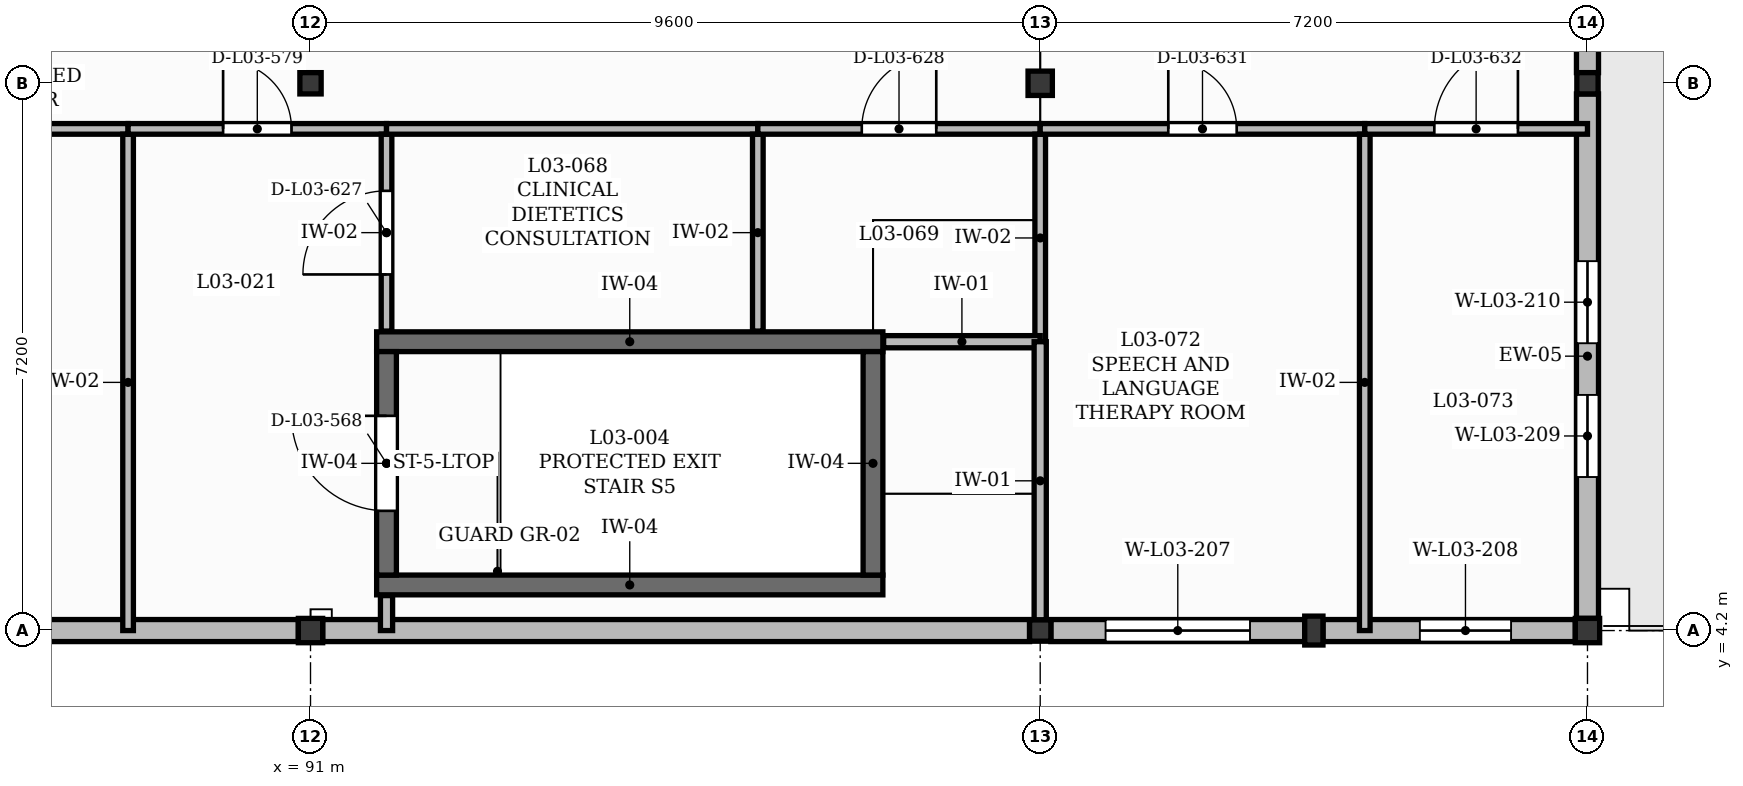
"""IFC4 building model, lengths in metres.
Left out: names, types, materials, properties, quantities, classifications, styles, units other than length and angle.
Written with IfcOpenShell. Run it as: python <this file> out.ifc"""

import sys

from ifc_helpers import new_model, si_unit, direction, frame, frame_2d, origin, origin_2d, place, context, subcontext, project, spatial, rectangle, extrude, element, fill, save


model = new_model("IFC4")
c1 = context("Model", 3, precision=1e-05, world=origin(), true_north=direction((0.0, 1.0)))
c2 = subcontext(c1, "Body", "Model", "MODEL_VIEW")
j1 = project(units=[si_unit("LENGTHUNIT", "METRE"), si_unit("PLANEANGLEUNIT", "RADIAN")], contexts=[c1])
p1 = place(None, origin())
s1 = spatial("IfcSite", under=j1, at=p1, CompositionType="ELEMENT")
p2 = place(p1, origin())
s2 = spatial("IfcBuilding", under=s1, at=p2, CompositionType="ELEMENT")
p3 = place(p2, frame((0.0, 0.0, 13.2)))
s3 = spatial("IfcBuildingStorey", under=s2, at=p3, CompositionType="ELEMENT", Elevation=13.2)
p4 = place(p3, frame((91.0, 4.2, 0.0), z_axis=(0.0, 0.0, 1.0), x_axis=(1.0, 0.0, 0.0)))
e1 = element("IfcColumn", 1, at=p4, inside=s3, PredefinedType="COLUMN", context=c2, shape_type="SweptSolid", body=[
    extrude(rectangle(XDim=0.32, YDim=0.32, at=origin_2d()), origin(), (0.0, 0.0, 1.0), 3.98),
])
p5 = place(p3, frame((91.0, 11.4, 0.0), z_axis=(0.0, 0.0, 1.0), x_axis=(1.0, 0.0, 0.0)))
e2 = element("IfcColumn", 2, at=p5, inside=s3, PredefinedType="COLUMN", context=c2, shape_type="SweptSolid", body=[
    extrude(rectangle(XDim=0.28, YDim=0.28, at=origin_2d()), origin(), (0.0, 0.0, 1.0), 6.045),
])
p6 = place(p3, frame((100.6, 4.2, 0.0), z_axis=(0.0, 0.0, 1.0), x_axis=(1.0, 0.0, 0.0)))
e3 = element("IfcColumn", 3, at=p6, inside=s3, PredefinedType="COLUMN", context=c2, shape_type="SweptSolid", body=[
    extrude(rectangle(XDim=0.28, YDim=0.28, at=origin_2d()), origin(), (0.0, 0.0, 1.0), 3.98),
])
p7 = place(p3, frame((100.6, 11.4, 0.0), z_axis=(0.0, 0.0, 1.0), x_axis=(1.0, 0.0, 0.0)))
e4 = element("IfcColumn", 4, at=p7, inside=s3, PredefinedType="COLUMN", context=c2, shape_type="SweptSolid", body=[
    extrude(rectangle(XDim=0.32, YDim=0.32, at=origin_2d()), origin(), (0.0, 0.0, 1.0), 6.045),
])
p8 = place(p3, frame((107.8, 4.2, 0.0), z_axis=(0.0, 0.0, 1.0), x_axis=(1.0, 0.0, 0.0)))
e5 = element("IfcColumn", 5, at=p8, inside=s3, PredefinedType="COLUMN", context=c2, shape_type="SweptSolid", body=[
    extrude(rectangle(XDim=0.32, YDim=0.32, at=origin_2d()), origin(), (0.0, 0.0, 1.0), 3.98),
])
p9 = place(p3, frame((107.8, 11.4, 0.0), z_axis=(0.0, 0.0, 1.0), x_axis=(1.0, 0.0, 0.0)))
e6 = element("IfcColumn", 6, at=p9, inside=s3, PredefinedType="COLUMN", context=c2, shape_type="SweptSolid", body=[
    extrude(rectangle(XDim=0.28, YDim=0.28, at=origin_2d()), origin(), (0.0, 0.0, 1.0), 6.045),
])
p10 = place(p3, frame((104.2, 4.2, 0.0), z_axis=(0.0, 0.0, 1.0), x_axis=(1.0, 0.0, 0.0)))
e7 = element("IfcColumn", 7, at=p10, inside=s3, PredefinedType="PILASTER", context=c2, shape_type="SweptSolid", body=[
    extrude(rectangle(XDim=0.24, YDim=0.38, at=origin_2d()), origin(), (0.0, 0.0, 1.0), 4.0),
])
p11 = place(p3, frame((86.32, 4.2, 0.0), z_axis=(0.0, 0.0, 1.0), x_axis=(1.0, 0.0, 0.0)))
e8 = element("IfcWall", 8, at=p11, inside=s3, PredefinedType="SOLIDWALL", context=c2, shape_type="SweptSolid", body=[
    extrude(rectangle(XDim=4.52, YDim=0.29, at=frame_2d((2.26, 0.0))), origin(), (0.0, 0.0, 1.0), 4.0),
])
p12 = place(p3, frame((91.16, 4.2, 0.0), z_axis=(0.0, 0.0, 1.0), x_axis=(1.0, 0.0, 0.0)))
e9 = element("IfcWall", 9, at=p12, inside=s3, PredefinedType="SOLIDWALL", context=c2, shape_type="SweptSolid", body=[
    extrude(rectangle(XDim=9.3, YDim=0.29, at=frame_2d((4.65, 0.0))), origin(), (0.0, 0.0, 1.0), 4.0),
])
p13 = place(p3, frame((100.74, 4.2, 0.0), z_axis=(0.0, 0.0, 1.0), x_axis=(1.0, 0.0, 0.0)))
e10 = element("IfcWall", 10, at=p13, inside=s3, PredefinedType="SOLIDWALL", context=c2, shape_type="SweptSolid", body=[
    extrude(rectangle(XDim=3.34, YDim=0.29, at=frame_2d((1.67, 0.0))), origin(), (0.0, 0.0, 1.0), 4.0),
])
p14 = place(p13, frame((0.72, 0.0, 1.0)))
e11 = element("IfcOpeningElement", 11, at=p14, cuts=e10, PredefinedType="OPENING", context=c2, shape_type="SweptSolid", body=[
    extrude(rectangle(XDim=1.9, YDim=1.95, at=frame_2d((0.95, 0.975))), frame((0.0, 0.155, 0.0), z_axis=(0.0, -1.0, 0.0), x_axis=(1.0, 0.0, 0.0)), (0.0, 0.0, 1.0), 0.31),
])
p15 = place(p3, frame((104.32, 4.2, 0.0), z_axis=(0.0, 0.0, 1.0), x_axis=(1.0, 0.0, 0.0)))
e12 = element("IfcWall", 12, at=p15, inside=s3, PredefinedType="SOLIDWALL", context=c2, shape_type="SweptSolid", body=[
    extrude(rectangle(XDim=3.32, YDim=0.29, at=frame_2d((1.66, 0.0))), origin(), (0.0, 0.0, 1.0), 4.0),
])
p16 = place(p15, frame((1.275, 0.0, 1.0)))
e13 = element("IfcOpeningElement", 13, at=p16, cuts=e12, PredefinedType="OPENING", context=c2, shape_type="SweptSolid", body=[
    extrude(rectangle(XDim=1.2, YDim=1.95, at=frame_2d((0.6, 0.975))), frame((0.0, 0.155, 0.0), z_axis=(0.0, -1.0, 0.0), x_axis=(1.0, 0.0, 0.0)), (0.0, 0.0, 1.0), 0.31),
])
p17 = place(p3, frame((107.8, 4.36, 0.0), z_axis=(0.0, 0.0, 1.0), x_axis=(0.0, 1.0, 0.0)))
e14 = element("IfcWall", 14, at=p17, inside=s3, PredefinedType="SOLIDWALL", context=c2, shape_type="SweptSolid", body=[
    extrude(rectangle(XDim=6.9, YDim=0.29, at=frame_2d((3.45, 0.0))), origin(), (0.0, 0.0, 1.0), 4.0),
])
p18 = place(p17, frame((1.86, 0.0, 1.0)))
e15 = element("IfcOpeningElement", 15, at=p18, cuts=e14, PredefinedType="OPENING", context=c2, shape_type="SweptSolid", body=[
    extrude(rectangle(XDim=1.08, YDim=1.95, at=frame_2d((0.54, 0.975))), frame((0.0, 0.155, 0.0), z_axis=(0.0, -1.0, 0.0), x_axis=(1.0, 0.0, 0.0)), (0.0, 0.0, 1.0), 0.31),
])
p19 = place(p17, frame((3.62, 0.0, 1.0)))
e16 = element("IfcOpeningElement", 16, at=p19, cuts=e14, PredefinedType="OPENING", context=c2, shape_type="SweptSolid", body=[
    extrude(rectangle(XDim=1.08, YDim=1.95, at=frame_2d((0.54, 0.975))), frame((0.0, 0.155, 0.0), z_axis=(0.0, -1.0, 0.0), x_axis=(1.0, 0.0, 0.0)), (0.0, 0.0, 1.0), 0.31),
])
p20 = place(p3, frame((107.8, 11.54, 0.0), z_axis=(0.0, 0.0, 1.0), x_axis=(0.0, 1.0, 0.0)))
e17 = element("IfcWall", 17, at=p20, inside=s3, PredefinedType="SOLIDWALL", context=c2, shape_type="SweptSolid", body=[
    extrude(rectangle(XDim=6.9, YDim=0.29, at=frame_2d((3.45, 0.0))), origin(), (0.0, 0.0, 1.0), 4.0),
])
p21 = place(p20, frame((2.9, 0.0, 0.0)))
e18 = element("IfcOpeningElement", 18, at=p21, cuts=e17, PredefinedType="OPENING", context=c2, shape_type="SweptSolid", body=[
    extrude(rectangle(XDim=1.1, YDim=2.25, at=frame_2d((0.55, 1.125))), frame((0.0, 0.155, 0.0), z_axis=(0.0, -1.0, 0.0), x_axis=(1.0, 0.0, 0.0)), (0.0, 0.0, 1.0), 0.31),
])
p22 = place(p20, frame((4.82, 0.0, 1.0)))
e19 = element("IfcOpeningElement", 19, at=p22, cuts=e17, PredefinedType="OPENING", context=c2, shape_type="SweptSolid", body=[
    extrude(rectangle(XDim=1.2, YDim=1.95, at=frame_2d((0.6, 0.975))), frame((0.0, 0.155, 0.0), z_axis=(0.0, -1.0, 0.0), x_axis=(1.0, 0.0, 0.0)), (0.0, 0.0, 1.0), 0.31),
])
for number, where, z_axis, x_axis in (
    (20, (91.87, 4.8, 0.0), (0.0, 0.0, 1.0), (1.0, 0.0, 0.0)),
    (21, (91.87, 8.0, 0.0), (0.0, 0.0, 1.0), (1.0, 0.0, 0.0)),
):
    element("IfcWall", number, at=place(p3, frame(where, z_axis=z_axis, x_axis=x_axis)), inside=s3, PredefinedType="SHEAR", context=c2, shape_type="SweptSolid", body=[
        extrude(rectangle(XDim=6.66, YDim=0.26, at=frame_2d((3.33, 0.0))), origin(), (0.0, 0.0, 1.0), 3.85),
    ])
p23 = place(p3, frame((92.0, 4.93, 0.0), z_axis=(0.0, 0.0, 1.0), x_axis=(0.0, 1.0, 0.0)))
e22 = element("IfcWall", 22, at=p23, inside=s3, PredefinedType="SHEAR", context=c2, shape_type="SweptSolid", body=[
    extrude(rectangle(XDim=2.94, YDim=0.26, at=frame_2d((1.47, 0.0))), origin(), (0.0, 0.0, 1.0), 3.85),
])
p24 = place(p23, frame((0.845, 0.0, 0.0)))
e23 = element("IfcOpeningElement", 23, at=p24, cuts=e22, PredefinedType="OPENING", context=c2, shape_type="SweptSolid", body=[
    extrude(rectangle(XDim=1.25, YDim=2.15, at=frame_2d((0.625, 1.075))), frame((0.0, 0.14, 0.0), z_axis=(0.0, -1.0, 0.0), x_axis=(1.0, 0.0, 0.0)), (0.0, 0.0, 1.0), 0.28),
])
p25 = place(p3, frame((98.4, 4.93, 0.0), z_axis=(0.0, 0.0, 1.0), x_axis=(0.0, 1.0, 0.0)))
e24 = element("IfcWall", 24, at=p25, inside=s3, PredefinedType="SHEAR", context=c2, shape_type="SweptSolid", body=[
    extrude(rectangle(XDim=2.94, YDim=0.26, at=frame_2d((1.47, 0.0))), origin(), (0.0, 0.0, 1.0), 3.85),
])
p26 = place(p3, frame((81.4, 10.8, 0.0), z_axis=(0.0, 0.0, 1.0), x_axis=(1.0, 0.0, 0.0)))
e25 = element("IfcWall", 25, at=p26, inside=s3, PredefinedType="PARTITIONING", context=c2, shape_type="SweptSolid", body=[
    extrude(rectangle(XDim=7.2, YDim=0.14, at=frame_2d((3.6, 0.0))), origin(), (0.0, 0.0, 1.0), 3.75),
])
p27 = place(p26, frame((3.15, 0.0, 0.0)))
e26 = element("IfcOpeningElement", 26, at=p27, cuts=e25, PredefinedType="OPENING", context=c2, shape_type="SweptSolid", body=[
    extrude(rectangle(XDim=0.9, YDim=2.1, at=frame_2d((0.45, 1.05))), frame((0.0, 0.08, 0.0), z_axis=(0.0, -1.0, 0.0), x_axis=(1.0, 0.0, 0.0)), (0.0, 0.0, 1.0), 0.16),
])
p28 = place(p3, frame((88.6, 4.2, 0.0), z_axis=(0.0, 0.0, 1.0), x_axis=(0.0, 1.0, 0.0)))
e27 = element("IfcWall", 27, at=p28, inside=s3, PredefinedType="PARTITIONING", context=c2, shape_type="SweptSolid", body=[
    extrude(rectangle(XDim=6.53, YDim=0.14, at=frame_2d((3.265, 0.0))), origin(), (0.0, 0.0, 1.0), 3.75),
])
p29 = place(p3, frame((88.6, 10.8, 0.0), z_axis=(0.0, 0.0, 1.0), x_axis=(1.0, 0.0, 0.0)))
e28 = element("IfcWall", 28, at=p29, inside=s3, PredefinedType="PARTITIONING", context=c2, shape_type="SweptSolid", body=[
    extrude(rectangle(XDim=3.4, YDim=0.14, at=frame_2d((1.7, 0.0))), origin(), (0.0, 0.0, 1.0), 3.75),
])
p30 = place(p29, frame((1.25, 0.0, 0.0)))
e29 = element("IfcOpeningElement", 29, at=p30, cuts=e28, PredefinedType="OPENING", context=c2, shape_type="SweptSolid", body=[
    extrude(rectangle(XDim=0.9, YDim=2.1, at=frame_2d((0.45, 1.05))), frame((0.0, 0.08, 0.0), z_axis=(0.0, -1.0, 0.0), x_axis=(1.0, 0.0, 0.0)), (0.0, 0.0, 1.0), 0.16),
])
p31 = place(p3, frame((92.0, 8.14, 0.0), z_axis=(0.0, 0.0, 1.0), x_axis=(0.0, 1.0, 0.0)))
e30 = element("IfcWall", 30, at=p31, inside=s3, PredefinedType="PARTITIONING", context=c2, shape_type="SweptSolid", body=[
    extrude(rectangle(XDim=2.59, YDim=0.14, at=frame_2d((1.295, 0.0))), origin(), (0.0, 0.0, 1.0), 3.75),
])
p32 = place(p31, frame((0.745, 0.0, 0.0)))
e31 = element("IfcOpeningElement", 31, at=p32, cuts=e30, PredefinedType="OPENING", context=c2, shape_type="SweptSolid", body=[
    extrude(rectangle(XDim=1.1, YDim=2.1, at=frame_2d((0.55, 1.05))), frame((0.0, 0.08, 0.0), z_axis=(0.0, -1.0, 0.0), x_axis=(1.0, 0.0, 0.0)), (0.0, 0.0, 1.0), 0.16),
])
p33 = place(p3, frame((92.0, 10.8, 0.0), z_axis=(0.0, 0.0, 1.0), x_axis=(1.0, 0.0, 0.0)))
e32 = element("IfcWall", 32, at=p33, inside=s3, PredefinedType="PARTITIONING", context=c2, shape_type="SweptSolid", body=[
    extrude(rectangle(XDim=4.885, YDim=0.14, at=frame_2d((2.442, 0.0))), origin(), (0.0, 0.0, 1.0), 3.75),
])
p34 = place(p3, frame((96.885, 8.14, 0.0), z_axis=(0.0, 0.0, 1.0), x_axis=(0.0, 1.0, 0.0)))
e33 = element("IfcWall", 33, at=p34, inside=s3, PredefinedType="PARTITIONING", context=c2, shape_type="SweptSolid", body=[
    extrude(rectangle(XDim=2.59, YDim=0.14, at=frame_2d((1.295, 0.0))), origin(), (0.0, 0.0, 1.0), 3.75),
])
p35 = place(p3, frame((96.885, 10.8, 0.0), z_axis=(0.0, 0.0, 1.0), x_axis=(1.0, 0.0, 0.0)))
e34 = element("IfcWall", 34, at=p35, inside=s3, PredefinedType="PARTITIONING", context=c2, shape_type="SweptSolid", body=[
    extrude(rectangle(XDim=3.715, YDim=0.14, at=frame_2d((1.857, 0.0))), origin(), (0.0, 0.0, 1.0), 3.75),
])
p36 = place(p35, frame((1.367, 0.0, 0.0)))
e35 = element("IfcOpeningElement", 35, at=p36, cuts=e34, PredefinedType="OPENING", context=c2, shape_type="SweptSolid", body=[
    extrude(rectangle(XDim=0.98, YDim=2.15, at=frame_2d((0.49, 1.075))), frame((0.0, 0.08, 0.0), z_axis=(0.0, -1.0, 0.0), x_axis=(1.0, 0.0, 0.0)), (0.0, 0.0, 1.0), 0.16),
])
p37 = place(p3, frame((100.6, 8.0, 0.0), z_axis=(0.0, 0.0, 1.0), x_axis=(0.0, 1.0, 0.0)))
e36 = element("IfcWall", 36, at=p37, inside=s3, PredefinedType="PARTITIONING", context=c2, shape_type="SweptSolid", body=[
    extrude(rectangle(XDim=2.73, YDim=0.14, at=frame_2d((1.365, 0.0))), origin(), (0.0, 0.0, 1.0), 3.75),
])
p38 = place(p3, frame((100.6, 10.8, 0.0), z_axis=(0.0, 0.0, 1.0), x_axis=(1.0, 0.0, 0.0)))
e37 = element("IfcWall", 37, at=p38, inside=s3, PredefinedType="PARTITIONING", context=c2, shape_type="SweptSolid", body=[
    extrude(rectangle(XDim=4.27, YDim=0.14, at=frame_2d((2.135, 0.0))), origin(), (0.0, 0.0, 1.0), 3.75),
])
p39 = place(p38, frame((1.685, 0.0, 0.0)))
e38 = element("IfcOpeningElement", 38, at=p39, cuts=e37, PredefinedType="OPENING", context=c2, shape_type="SweptSolid", body=[
    extrude(rectangle(XDim=0.9, YDim=2.1, at=frame_2d((0.45, 1.05))), frame((0.0, 0.08, 0.0), z_axis=(0.0, -1.0, 0.0), x_axis=(1.0, 0.0, 0.0)), (0.0, 0.0, 1.0), 0.16),
])
p40 = place(p3, frame((104.87, 4.2, 0.0), z_axis=(0.0, 0.0, 1.0), x_axis=(0.0, 1.0, 0.0)))
e39 = element("IfcWall", 39, at=p40, inside=s3, PredefinedType="PARTITIONING", context=c2, shape_type="SweptSolid", body=[
    extrude(rectangle(XDim=6.53, YDim=0.14, at=frame_2d((3.265, 0.0))), origin(), (0.0, 0.0, 1.0), 3.75),
])
p41 = place(p3, frame((104.87, 10.8, 0.0), z_axis=(0.0, 0.0, 1.0), x_axis=(1.0, 0.0, 0.0)))
e40 = element("IfcWall", 40, at=p41, inside=s3, PredefinedType="PARTITIONING", context=c2, shape_type="SweptSolid", body=[
    extrude(rectangle(XDim=2.93, YDim=0.14, at=frame_2d((1.465, 0.0))), origin(), (0.0, 0.0, 1.0), 3.75),
])
p42 = place(p41, frame((0.915, 0.0, 0.0)))
e41 = element("IfcOpeningElement", 41, at=p42, cuts=e40, PredefinedType="OPENING", context=c2, shape_type="SweptSolid", body=[
    extrude(rectangle(XDim=1.1, YDim=2.1, at=frame_2d((0.55, 1.05))), frame((0.0, 0.08, 0.0), z_axis=(0.0, -1.0, 0.0), x_axis=(1.0, 0.0, 0.0)), (0.0, 0.0, 1.0), 0.16),
])
p43 = place(p3, frame((92.0, 4.2, 0.0), z_axis=(0.0, 0.0, 1.0), x_axis=(0.0, 1.0, 0.0)))
e42 = element("IfcWall", 42, at=p43, inside=s3, PredefinedType="PARTITIONING", context=c2, shape_type="SweptSolid", body=[
    extrude(rectangle(XDim=0.46, YDim=0.16, at=frame_2d((0.23, 0.0))), origin(), (0.0, 0.0, 1.0), 3.75),
])
p44 = place(p3, frame((98.54, 8.0, 0.0), z_axis=(0.0, 0.0, 1.0), x_axis=(1.0, 0.0, 0.0)))
e43 = element("IfcWall", 43, at=p44, inside=s3, PredefinedType="PARTITIONING", context=c2, shape_type="SweptSolid", body=[
    extrude(rectangle(XDim=2.06, YDim=0.16, at=frame_2d((1.03, 0.0))), origin(), (0.0, 0.0, 1.0), 3.75),
])
p45 = place(p3, frame((100.6, 4.34, 0.0), z_axis=(0.0, 0.0, 1.0), x_axis=(0.0, 1.0, 0.0)))
e44 = element("IfcWall", 44, at=p45, inside=s3, PredefinedType="PARTITIONING", context=c2, shape_type="SweptSolid", body=[
    extrude(rectangle(XDim=3.66, YDim=0.16, at=frame_2d((1.83, 0.0))), origin(), (0.0, 0.0, 1.0), 3.75),
])
p46 = place(p14, origin())
e45 = element("IfcWindow", 45, at=p46, inside=s3, PartitioningType="DOUBLE_PANEL_VERTICAL", PredefinedType="WINDOW", context=c2, shape_type="SweptSolid", body=[
    extrude(rectangle(XDim=1.9, YDim=1.95, at=frame_2d((0.95, 0.975))), frame((0.0, 0.03, 0.0), z_axis=(0.0, -1.0, 0.0), x_axis=(1.0, 0.0, 0.0)), (0.0, 0.0, 1.0), 0.06),
])
fill(e11, e45)
p47 = place(p16, origin())
e46 = element("IfcWindow", 46, at=p47, inside=s3, PartitioningType="SINGLE_PANEL", PredefinedType="WINDOW", context=c2, shape_type="SweptSolid", body=[
    extrude(rectangle(XDim=1.2, YDim=1.95, at=frame_2d((0.6, 0.975))), frame((0.0, 0.03, 0.0), z_axis=(0.0, -1.0, 0.0), x_axis=(1.0, 0.0, 0.0)), (0.0, 0.0, 1.0), 0.06),
])
fill(e13, e46)
p48 = place(p18, origin())
e47 = element("IfcWindow", 47, at=p48, inside=s3, PartitioningType="SINGLE_PANEL", PredefinedType="WINDOW", context=c2, shape_type="SweptSolid", body=[
    extrude(rectangle(XDim=1.08, YDim=1.95, at=frame_2d((0.54, 0.975))), frame((0.0, 0.03, 0.0), z_axis=(0.0, -1.0, 0.0), x_axis=(1.0, 0.0, 0.0)), (0.0, 0.0, 1.0), 0.06),
])
fill(e15, e47)
p49 = place(p19, origin())
e48 = element("IfcWindow", 48, at=p49, inside=s3, PartitioningType="SINGLE_PANEL", PredefinedType="WINDOW", context=c2, shape_type="SweptSolid", body=[
    extrude(rectangle(XDim=1.08, YDim=1.95, at=frame_2d((0.54, 0.975))), frame((0.0, 0.03, 0.0), z_axis=(0.0, -1.0, 0.0), x_axis=(1.0, 0.0, 0.0)), (0.0, 0.0, 1.0), 0.06),
])
fill(e16, e48)
p50 = place(p24, origin())
e49 = element("IfcDoor", 49, at=p50, inside=s3, OperationType="SINGLE_SWING_RIGHT", PredefinedType="DOOR", context=c2, shape_type="SweptSolid", body=[
    extrude(rectangle(XDim=1.25, YDim=2.15, at=frame_2d((0.625, 1.075))), frame((0.0, 0.025, 0.0), z_axis=(0.0, -1.0, 0.0), x_axis=(1.0, 0.0, 0.0)), (0.0, 0.0, 1.0), 0.05),
])
fill(e23, e49)
p51 = place(p30, origin())
e50 = element("IfcDoor", 50, at=p51, inside=s3, OperationType="SINGLE_SWING_LEFT", PredefinedType="DOOR", context=c2, shape_type="SweptSolid", body=[
    extrude(rectangle(XDim=0.9, YDim=2.1, at=frame_2d((0.45, 1.05))), frame((0.0, 0.025, 0.0), z_axis=(0.0, -1.0, 0.0), x_axis=(1.0, 0.0, 0.0)), (0.0, 0.0, 1.0), 0.05),
])
fill(e29, e50)
p52 = place(p32, origin())
e51 = element("IfcDoor", 51, at=p52, inside=s3, OperationType="SINGLE_SWING_LEFT", PredefinedType="DOOR", context=c2, shape_type="SweptSolid", body=[
    extrude(rectangle(XDim=1.1, YDim=2.1, at=frame_2d((0.55, 1.05))), frame((0.0, 0.025, 0.0), z_axis=(0.0, -1.0, 0.0), x_axis=(1.0, 0.0, 0.0)), (0.0, 0.0, 1.0), 0.05),
])
fill(e31, e51)
p53 = place(p36, origin())
e52 = element("IfcDoor", 52, at=p53, inside=s3, OperationType="SINGLE_SWING_RIGHT", PredefinedType="DOOR", context=c2, shape_type="SweptSolid", body=[
    extrude(rectangle(XDim=0.98, YDim=2.15, at=frame_2d((0.49, 1.075))), frame((0.0, 0.025, 0.0), z_axis=(0.0, -1.0, 0.0), x_axis=(1.0, 0.0, 0.0)), (0.0, 0.0, 1.0), 0.05),
])
fill(e35, e52)
p54 = place(p39, origin())
e53 = element("IfcDoor", 53, at=p54, inside=s3, OperationType="SINGLE_SWING_LEFT", PredefinedType="DOOR", context=c2, shape_type="SweptSolid", body=[
    extrude(rectangle(XDim=0.9, YDim=2.1, at=frame_2d((0.45, 1.05))), frame((0.0, 0.025, 0.0), z_axis=(0.0, -1.0, 0.0), x_axis=(1.0, 0.0, 0.0)), (0.0, 0.0, 1.0), 0.05),
])
fill(e38, e53)
p55 = place(p42, origin())
e54 = element("IfcDoor", 54, at=p55, inside=s3, OperationType="SINGLE_SWING_RIGHT", PredefinedType="DOOR", context=c2, shape_type="SweptSolid", body=[
    extrude(rectangle(XDim=1.1, YDim=2.1, at=frame_2d((0.55, 1.05))), frame((0.0, 0.025, 0.0), z_axis=(0.0, -1.0, 0.0), x_axis=(1.0, 0.0, 0.0)), (0.0, 0.0, 1.0), 0.05),
])
fill(e41, e54)
save(model, sys.argv[1])
